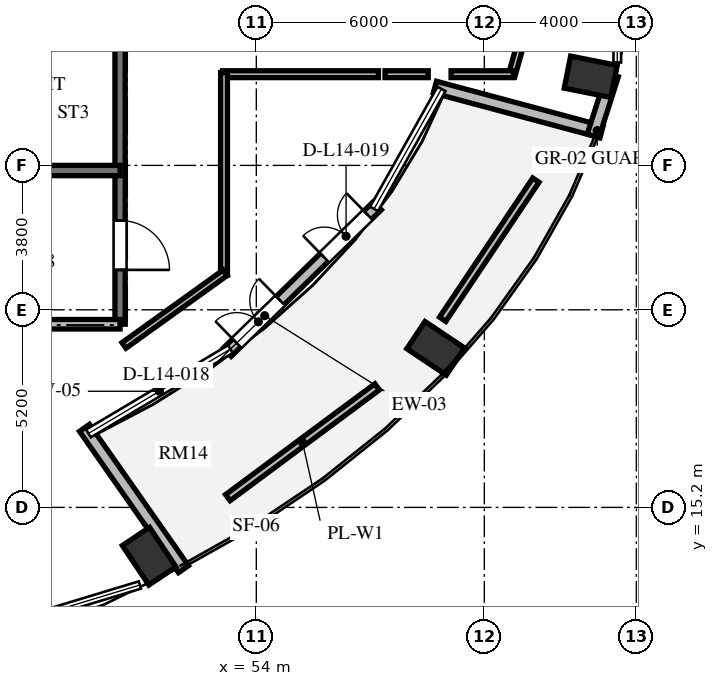
"""IFC4 building model, lengths in metres.
Left out: names, types, materials, properties, quantities, classifications, styles, units other than length and angle.
Written with IfcOpenShell. Run it as: python <this file> out.ifc"""

import sys

from ifc_helpers import new_model, si_unit, direction, frame, frame_2d, origin, origin_2d, place, context, subcontext, project, spatial, rectangle, extrude, element, fill, save


model = new_model("IFC4")
c1 = context("Model", 3, precision=1e-05, world=origin(), true_north=direction((0.0, 1.0)))
c2 = subcontext(c1, "Body", "Model", "MODEL_VIEW")
j1 = project(units=[si_unit("LENGTHUNIT", "METRE"), si_unit("PLANEANGLEUNIT", "RADIAN")], contexts=[c1])
p1 = place(None, origin())
s1 = spatial("IfcSite", under=j1, at=p1, CompositionType="ELEMENT")
p2 = place(p1, origin())
s2 = spatial("IfcBuilding", under=s1, at=p2, CompositionType="ELEMENT")
p3 = place(p2, frame((0.0, 0.0, 58.032)))
s3 = spatial("IfcBuildingStorey", under=s2, at=p3, CompositionType="ELEMENT", Elevation=58.032)
for number, where, z_axis, x_axis in (
    (1, (51.181, 13.916, 0.0), (0.0, 0.0, 1.0), (0.556, -0.831, 0.0)),
    (2, (58.72, 19.386, 0.0), (0.0, 0.0, 1.0), (0.831, -0.556, 0.0)),
    (3, (62.8, 26.532, 0.0), (0.0, 0.0, 1.0), (0.981, -0.195, 0.0)),
):
    element("IfcColumn", number, at=place(p3, frame(where, z_axis=z_axis, x_axis=x_axis)), inside=s3, PredefinedType="COLUMN", context=c2, shape_type="SweptSolid", body=[
        extrude(rectangle(XDim=1.25, YDim=0.86, at=origin_2d()), origin(), (0.0, 0.0, 1.0), 3.648),
    ])
p4 = place(p3, frame((53.233, 19.281, 0.0), z_axis=(0.0, 0.0, 1.0), x_axis=(0.71569731989, 0.698410585761, 0.0)))
e4 = element("IfcWall", 4, at=p4, inside=s3, PredefinedType="SOLIDWALL", context=c2, shape_type="SweptSolid", body=[
    extrude(rectangle(XDim=5.522, YDim=0.3, at=frame_2d((2.761, 0.0))), origin(), (0.0, 0.0, 1.0), 3.428),
])
p5 = place(p4, frame((0.35, 0.0, 0.02)))
e5 = element("IfcOpeningElement", 5, at=p5, cuts=e4, PredefinedType="OPENING", context=c2, shape_type="SweptSolid", body=[
    extrude(rectangle(XDim=1.6, YDim=2.3, at=frame_2d((0.8, 1.15))), frame((0.0, 0.16, 0.0), z_axis=(0.0, -1.0, 0.0), x_axis=(1.0, 0.0, 0.0)), (0.0, 0.0, 1.0), 0.32),
])
p6 = place(p4, frame((3.572, 0.0, 0.02)))
e6 = element("IfcOpeningElement", 6, at=p6, cuts=e4, PredefinedType="OPENING", context=c2, shape_type="SweptSolid", body=[
    extrude(rectangle(XDim=1.6, YDim=2.3, at=frame_2d((0.8, 1.15))), frame((0.0, 0.16, 0.0), z_axis=(0.0, -1.0, 0.0), x_axis=(1.0, 0.0, 0.0)), (0.0, 0.0, 1.0), 0.32),
])
p7 = place(p3, frame((52.083, 13.575, 0.0), z_axis=(0.0, 0.0, 1.0), x_axis=(-0.573592269695, 0.819140957434, 0.0)))
e7 = element("IfcWall", 7, at=p7, inside=s3, PredefinedType="SOLIDWALL", context=c2, shape_type="SweptSolid", body=[
    extrude(rectangle(XDim=4.54, YDim=0.32, at=frame_2d((2.27, 0.0))), origin(), (0.0, 0.0, 1.0), 3.428),
])
p8 = place(p3, frame((63.085, 25.084, 0.0), z_axis=(0.0, 0.0, 1.0), x_axis=(-0.965941571447, 0.258760276223, 0.0)))
e8 = element("IfcWall", 8, at=p8, inside=s3, PredefinedType="SOLIDWALL", context=c2, shape_type="SweptSolid", body=[
    extrude(rectangle(XDim=4.54, YDim=0.32, at=frame_2d((2.27, 0.0))), origin(), (0.0, 0.0, 1.0), 3.428),
])
p9 = place(p3, frame((62.862, 24.978, 0.0), z_axis=(0.0, 0.0, 1.0), x_axis=(0.303964491771, 0.952683361743, 0.0)))
e9 = element("IfcWall", 9, at=p9, inside=s3, PredefinedType="SOLIDWALL", context=c2, shape_type="SweptSolid", body=[
    extrude(rectangle(XDim=1.682, YDim=0.32, at=frame_2d((0.841, 0.0))), origin(), (0.0, 0.0, 1.0), 3.428),
])
p10 = place(p3, frame((53.251, 15.457, 0.0), z_axis=(0.0, 0.0, 1.0), x_axis=(0.802984756963, 0.59599956383, 0.0)))
e10 = element("IfcWall", 10, at=p10, inside=s3, PredefinedType="PARAPET", context=c2, shape_type="SweptSolid", body=[
    extrude(rectangle(XDim=4.891, YDim=0.2, at=frame_2d((2.446, 0.0))), origin(), (0.0, 0.0, 1.0), 0.55),
])
p11 = place(p3, frame((58.905, 20.151, 0.0), z_axis=(0.0, 0.0, 1.0), x_axis=(0.556514541945, 0.830837869023, 0.0)))
e11 = element("IfcWall", 11, at=p11, inside=s3, PredefinedType="PARAPET", context=c2, shape_type="SweptSolid", body=[
    extrude(rectangle(XDim=4.406, YDim=0.2, at=frame_2d((2.203, 0.0))), origin(), (0.0, 0.0, 1.0), 0.55),
])
p12 = place(p3, frame((50.415, 35.845, 0.0), z_axis=(0.0, 0.0, 1.0), x_axis=(0.0, -1.0, 0.0)))
e12 = element("IfcWall", 12, at=p12, inside=s3, PredefinedType="SHEAR", context=c2, shape_type="SweptSolid", body=[
    extrude(rectangle(XDim=15.825, YDim=0.27, at=frame_2d((7.913, 0.0))), origin(), (0.0, 0.0, 1.0), 3.648),
])
p13 = place(p12, frame((4.445, 0.0, 0.0)))
e13 = element("IfcOpeningElement", 13, at=p13, cuts=e12, PredefinedType="OPENING", context=c2, shape_type="SweptSolid", body=[
    extrude(rectangle(XDim=1.2, YDim=2.15, at=frame_2d((0.6, 1.075))), frame((0.0, 0.145, 0.0), z_axis=(0.0, -1.0, 0.0), x_axis=(1.0, 0.0, 0.0)), (0.0, 0.0, 1.0), 0.29),
])
p14 = place(p12, frame((1.295, 0.0, 0.0)))
e14 = element("IfcOpeningElement", 14, at=p14, cuts=e12, PredefinedType="OPENING", context=c2, shape_type="SweptSolid", body=[
    extrude(rectangle(XDim=1.3, YDim=2.2, at=frame_2d((0.65, 1.1))), frame((0.0, 0.145, 0.0), z_axis=(0.0, -1.0, 0.0), x_axis=(1.0, 0.0, 0.0)), (0.0, 0.0, 1.0), 0.29),
])
p15 = place(p12, frame((13.095, 0.0, 0.0)))
e15 = element("IfcOpeningElement", 15, at=p15, cuts=e12, PredefinedType="OPENING", context=c2, shape_type="SweptSolid", body=[
    extrude(rectangle(XDim=1.3, YDim=2.2, at=frame_2d((0.65, 1.1))), frame((0.0, 0.145, 0.0), z_axis=(0.0, -1.0, 0.0), x_axis=(1.0, 0.0, 0.0)), (0.0, 0.0, 1.0), 0.29),
])
p16 = place(p3, frame((45.7, 24.065, 0.0), z_axis=(0.0, 0.0, 1.0), x_axis=(1.0, 0.0, 0.0)))
e16 = element("IfcWall", 16, at=p16, inside=s3, PredefinedType="SHEAR", context=c2, shape_type="SweptSolid", body=[
    extrude(rectangle(XDim=4.715, YDim=0.27, at=frame_2d((2.357, 0.0))), origin(), (0.0, 0.0, 1.0), 3.648),
])
p17 = place(p3, frame((45.7, 20.02, 0.0), z_axis=(0.0, 0.0, 1.0), x_axis=(1.0, 0.0, 0.0)))
e17 = element("IfcWall", 17, at=p17, inside=s3, PredefinedType="SOLIDWALL", context=c2, shape_type="SweptSolid", body=[
    extrude(rectangle(XDim=4.715, YDim=0.25, at=frame_2d((2.357, 0.0))), origin(), (0.0, 0.0, 1.0), 3.428),
])
p18 = place(p3, frame((61.154, 28.107, 0.0), z_axis=(0.0, 0.0, 1.0), x_axis=(-0.271748942561, -0.962368179138, 0.0)))
e18 = element("IfcWall", 18, at=p18, inside=s3, PredefinedType="PARTITIONING", context=c2, shape_type="SweptSolid", body=[
    extrude(rectangle(XDim=1.606, YDim=0.18, at=frame_2d((0.803, 0.0))), origin(), (0.0, 0.0, 1.0), 3.428),
])
p19 = place(p3, frame((60.768, 26.6, 0.0), z_axis=(0.0, 0.0, 1.0), x_axis=(-1.0, 0.0, 0.0)))
e19 = element("IfcWall", 19, at=p19, inside=s3, PredefinedType="PARTITIONING", context=c2, shape_type="SweptSolid", body=[
    extrude(rectangle(XDim=1.643, YDim=0.18, at=frame_2d((0.822, 0.0))), origin(), (0.0, 0.0, 1.0), 3.428),
])
p20 = place(p3, frame((58.523, 26.6, 0.0), z_axis=(0.0, 0.0, 1.0), x_axis=(-1.0, 0.0, 0.0)))
e20 = element("IfcWall", 20, at=p20, inside=s3, PredefinedType="PARTITIONING", context=c2, shape_type="SweptSolid", body=[
    extrude(rectangle(XDim=1.137, YDim=0.18, at=frame_2d((0.568, 0.0))), origin(), (0.0, 0.0, 1.0), 3.428),
])
p21 = place(p3, frame((57.213, 26.6, 0.0), z_axis=(0.0, 0.0, 1.0), x_axis=(-1.0, 0.0, 0.0)))
e21 = element("IfcWall", 21, at=p21, inside=s3, PredefinedType="PARTITIONING", context=c2, shape_type="SweptSolid", body=[
    extrude(rectangle(XDim=4.103, YDim=0.18, at=frame_2d((2.052, 0.0))), origin(), (0.0, 0.0, 1.0), 3.428),
])
p22 = place(p3, frame((53.15, 26.64, 0.0), z_axis=(0.0, 0.0, 1.0), x_axis=(0.0, -1.0, 0.0)))
e22 = element("IfcWall", 22, at=p22, inside=s3, PredefinedType="PARTITIONING", context=c2, shape_type="SweptSolid", body=[
    extrude(rectangle(XDim=5.327, YDim=0.18, at=frame_2d((2.664, 0.0))), origin(), (0.0, 0.0, 1.0), 3.428),
])
p23 = place(p3, frame((53.183, 21.376, 0.0), z_axis=(0.0, 0.0, 1.0), x_axis=(-0.812151980909, -0.583445935717, 0.0)))
e23 = element("IfcWall", 23, at=p23, inside=s3, PredefinedType="PARTITIONING", context=c2, shape_type="SweptSolid", body=[
    extrude(rectangle(XDim=3.281, YDim=0.18, at=frame_2d((1.641, 0.0))), origin(), (0.0, 0.0, 1.0), 3.428),
])
p24 = place(p5, origin())
e24 = element("IfcDoor", 24, at=p24, inside=s3, OperationType="DOUBLE_DOOR_SINGLE_SWING", PredefinedType="DOOR", context=c2, shape_type="SweptSolid", body=[
    extrude(rectangle(XDim=1.6, YDim=2.3, at=frame_2d((0.8, 1.15))), frame((0.0, 0.025, 0.0), z_axis=(0.0, -1.0, 0.0), x_axis=(1.0, 0.0, 0.0)), (0.0, 0.0, 1.0), 0.05),
])
fill(e5, e24)
p25 = place(p6, origin())
e25 = element("IfcDoor", 25, at=p25, inside=s3, OperationType="DOUBLE_DOOR_SINGLE_SWING", PredefinedType="DOOR", context=c2, shape_type="SweptSolid", body=[
    extrude(rectangle(XDim=1.6, YDim=2.3, at=frame_2d((0.8, 1.15))), frame((0.0, 0.025, 0.0), z_axis=(0.0, -1.0, 0.0), x_axis=(1.0, 0.0, 0.0)), (0.0, 0.0, 1.0), 0.05),
])
fill(e6, e25)
p26 = place(p15, origin())
e26 = element("IfcDoor", 26, at=p26, inside=s3, OperationType="SINGLE_SWING_RIGHT", PredefinedType="DOOR", context=c2, shape_type="SweptSolid", body=[
    extrude(rectangle(XDim=1.3, YDim=2.2, at=frame_2d((0.65, 1.1))), frame((0.0, 0.025, 0.0), z_axis=(0.0, -1.0, 0.0), x_axis=(1.0, 0.0, 0.0)), (0.0, 0.0, 1.0), 0.05),
])
fill(e15, e26)
save(model, sys.argv[1])
